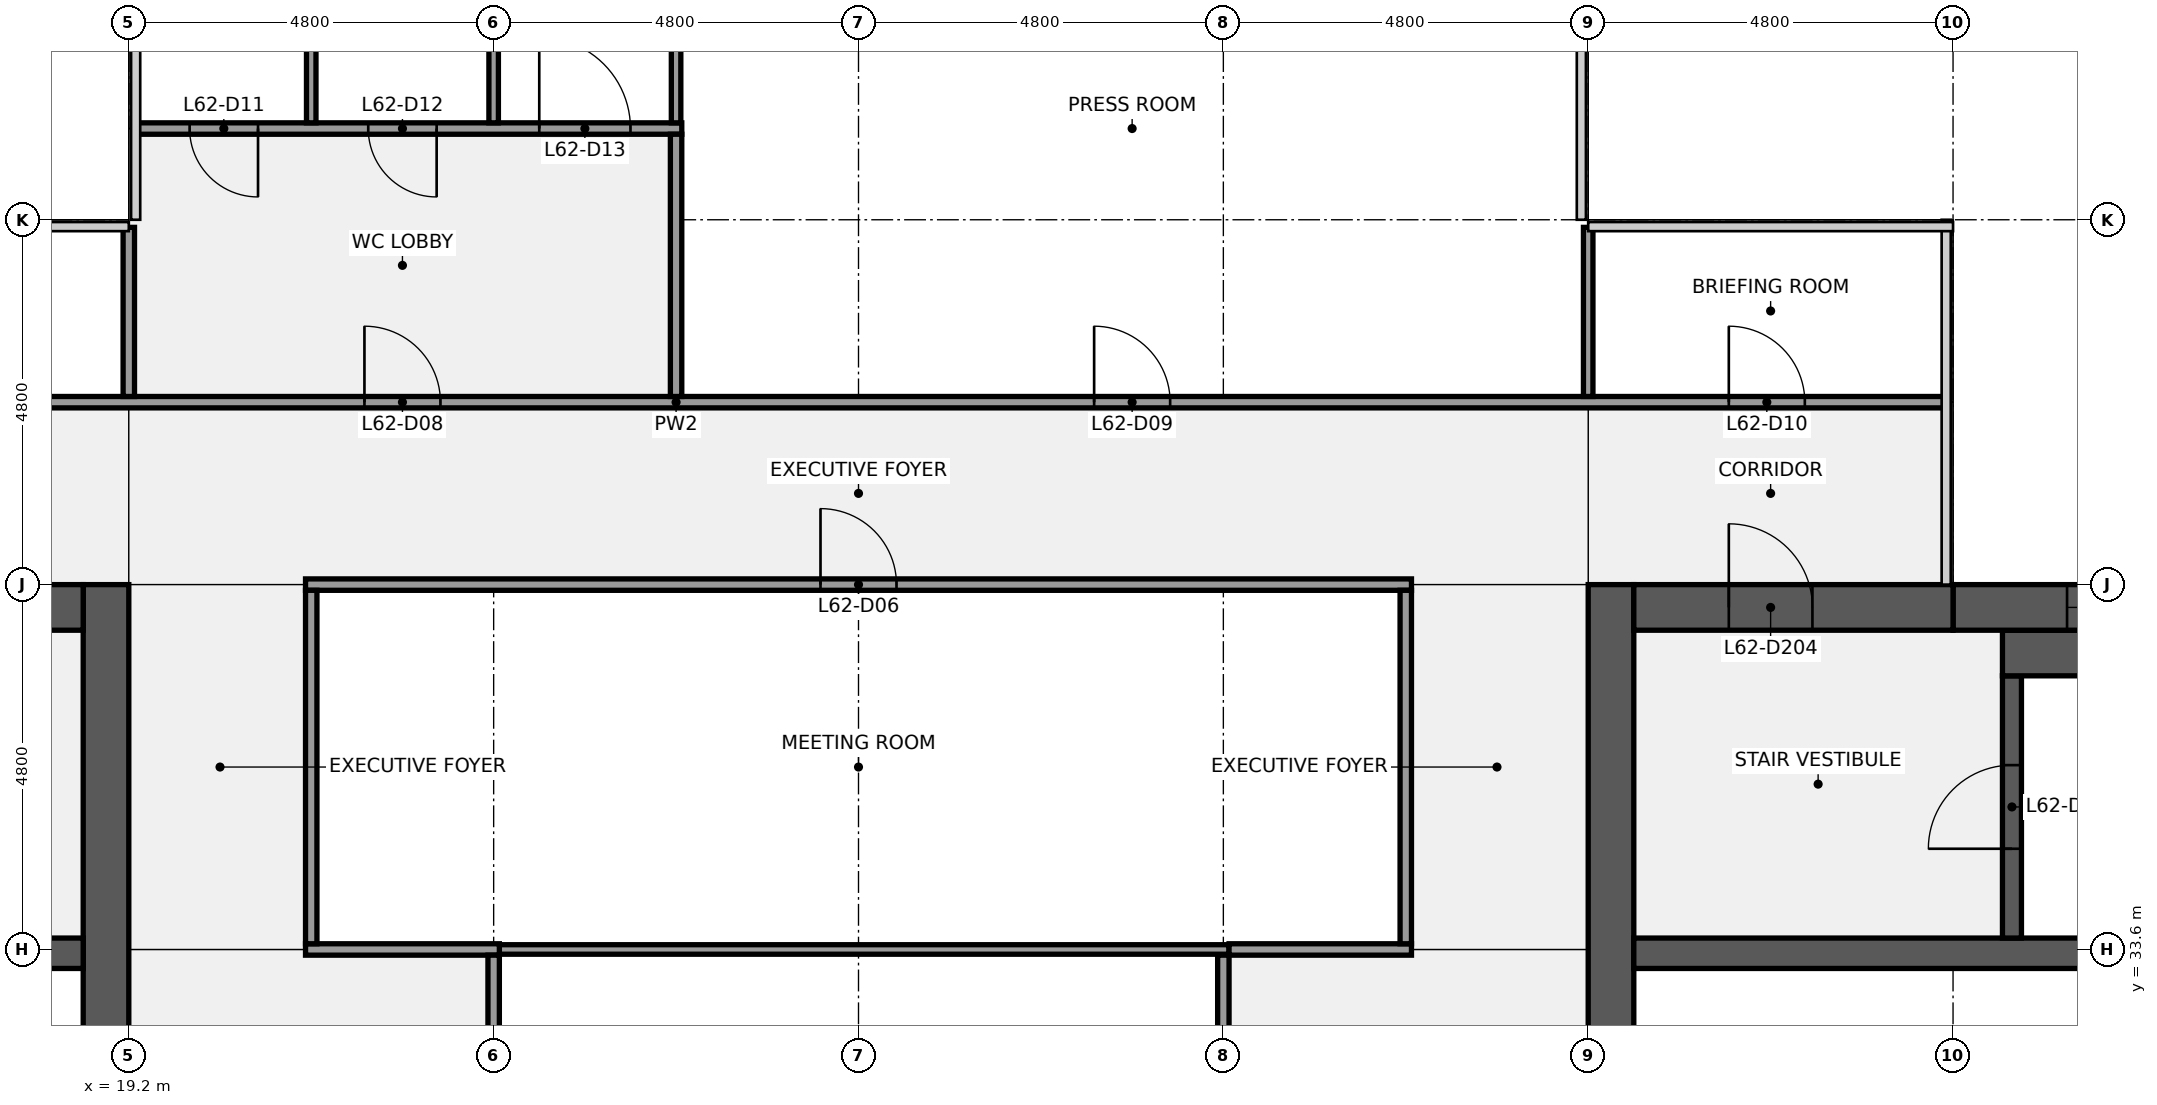
"""IFC4 building model, lengths in metres.
Left out: names, types, materials, properties, quantities, classifications, styles, units other than length and angle.
Written with IfcOpenShell. Run it as: python <this file> out.ifc"""

import sys

from ifc_helpers import new_model, si_unit, direction, frame, frame_2d, origin, place, context, subcontext, project, spatial, rectangle, extrude, element, fill, save


model = new_model("IFC4")
c1 = context("Model", 3, precision=1e-05, world=origin(), true_north=direction((0.0, 1.0)))
c2 = subcontext(c1, "Body", "Model", "MODEL_VIEW")
j1 = project(units=[si_unit("LENGTHUNIT", "METRE"), si_unit("PLANEANGLEUNIT", "RADIAN")], contexts=[c1])
p1 = place(None, origin())
s1 = spatial("IfcSite", under=j1, at=p1, CompositionType="ELEMENT")
p2 = place(p1, origin())
s2 = spatial("IfcBuilding", under=s1, at=p2, CompositionType="ELEMENT")
p3 = place(p2, frame((0.0, 0.0, 286.3)))
s3 = spatial("IfcBuildingStorey", under=s2, at=p3, CompositionType="ELEMENT", Elevation=286.3)
p4 = place(p3, frame((18.9, 38.4, 0.0), z_axis=(0.0, 0.0, 1.0), x_axis=(0.0, -1.0, 0.0)))
e1 = element("IfcWall", 1, at=p4, inside=s3, PredefinedType="SHEAR", context=c2, shape_type="SweptSolid", body=[
    extrude(rectangle(XDim=28.8, YDim=0.6, at=frame_2d((14.4, 0.0))), origin(), (0.0, 0.0, 1.0), 3.84),
])
p5 = place(p4, frame((18.3, 0.0, 0.0)))
e2 = element("IfcOpeningElement", 2, at=p5, cuts=e1, PredefinedType="OPENING", context=c2, shape_type="SweptSolid", body=[
    extrude(rectangle(XDim=1.8, YDim=2.1, at=frame_2d((0.9, 1.05))), frame((0.0, 0.31, 0.0), z_axis=(0.0, -1.0, 0.0), x_axis=(1.0, 0.0, 0.0)), (0.0, 0.0, 1.0), 0.62),
])
p6 = place(p4, frame((8.7, 0.0, 0.0)))
e3 = element("IfcOpeningElement", 3, at=p6, cuts=e1, PredefinedType="OPENING", context=c2, shape_type="SweptSolid", body=[
    extrude(rectangle(XDim=1.8, YDim=2.1, at=frame_2d((0.9, 1.05))), frame((0.0, 0.31, 0.0), z_axis=(0.0, -1.0, 0.0), x_axis=(1.0, 0.0, 0.0)), (0.0, 0.0, 1.0), 0.62),
])
p7 = place(p3, frame((0.6, 33.55, 0.0), z_axis=(0.0, 0.0, 1.0), x_axis=(1.0, 0.0, 0.0)))
e4 = element("IfcWall", 4, at=p7, inside=s3, PredefinedType="SHEAR", context=c2, shape_type="SweptSolid", body=[
    extrude(rectangle(XDim=18.0, YDim=0.4, at=frame_2d((9.0, 0.0))), origin(), (0.0, 0.0, 1.0), 3.84),
])
p8 = place(p3, frame((9.6, 38.1, 0.0), z_axis=(0.0, 0.0, 1.0), x_axis=(1.0, 0.0, 0.0)))
e5 = element("IfcWall", 5, at=p8, inside=s3, PredefinedType="SHEAR", context=c2, shape_type="SweptSolid", body=[
    extrude(rectangle(XDim=9.0, YDim=0.6, at=frame_2d((4.5, 0.0))), origin(), (0.0, 0.0, 1.0), 3.84),
])
p9 = place(p8, frame((6.65, 0.0, 0.0)))
e6 = element("IfcOpeningElement", 6, at=p9, cuts=e5, PredefinedType="OPENING", context=c2, shape_type="SweptSolid", body=[
    extrude(rectangle(XDim=1.1, YDim=2.1, at=frame_2d((0.55, 1.05))), frame((0.0, 0.31, 0.0), z_axis=(0.0, -1.0, 0.0), x_axis=(1.0, 0.0, 0.0)), (0.0, 0.0, 1.0), 0.62),
])
p10 = place(p3, frame((38.7, 9.6, 0.0), z_axis=(0.0, 0.0, 1.0), x_axis=(0.0, 1.0, 0.0)))
e7 = element("IfcWall", 7, at=p10, inside=s3, PredefinedType="SHEAR", context=c2, shape_type="SweptSolid", body=[
    extrude(rectangle(XDim=28.8, YDim=0.6, at=frame_2d((14.4, 0.0))), origin(), (0.0, 0.0, 1.0), 3.84),
])
p11 = place(p10, frame((8.7, 0.0, 0.0)))
e8 = element("IfcOpeningElement", 8, at=p11, cuts=e7, PredefinedType="OPENING", context=c2, shape_type="SweptSolid", body=[
    extrude(rectangle(XDim=1.8, YDim=2.1, at=frame_2d((0.9, 1.05))), frame((0.0, 0.31, 0.0), z_axis=(0.0, -1.0, 0.0), x_axis=(1.0, 0.0, 0.0)), (0.0, 0.0, 1.0), 0.62),
])
p12 = place(p10, frame((18.3, 0.0, 0.0)))
e9 = element("IfcOpeningElement", 9, at=p12, cuts=e7, PredefinedType="OPENING", context=c2, shape_type="SweptSolid", body=[
    extrude(rectangle(XDim=1.8, YDim=2.1, at=frame_2d((0.9, 1.05))), frame((0.0, 0.31, 0.0), z_axis=(0.0, -1.0, 0.0), x_axis=(1.0, 0.0, 0.0)), (0.0, 0.0, 1.0), 0.62),
])
p13 = place(p3, frame((39.0, 33.55, 0.0), z_axis=(0.0, 0.0, 1.0), x_axis=(1.0, 0.0, 0.0)))
e10 = element("IfcWall", 10, at=p13, inside=s3, PredefinedType="SHEAR", context=c2, shape_type="SweptSolid", body=[
    extrude(rectangle(XDim=18.0, YDim=0.4, at=frame_2d((9.0, 0.0))), origin(), (0.0, 0.0, 1.0), 3.84),
])
p14 = place(p3, frame((43.975, 33.75, 0.0), z_axis=(0.0, 0.0, 1.0), x_axis=(0.0, 1.0, 0.0)))
e11 = element("IfcWall", 11, at=p14, inside=s3, PredefinedType="SHEAR", context=c2, shape_type="SweptSolid", body=[
    extrude(rectangle(XDim=3.45, YDim=0.25, at=frame_2d((1.725, 0.0))), origin(), (0.0, 0.0, 1.0), 3.84),
])
p15 = place(p14, frame((1.175, 0.0, 0.0)))
e12 = element("IfcOpeningElement", 12, at=p15, cuts=e11, PredefinedType="OPENING", context=c2, shape_type="SweptSolid", body=[
    extrude(rectangle(XDim=1.1, YDim=2.1, at=frame_2d((0.55, 1.05))), frame((0.0, 0.135, 0.0), z_axis=(0.0, -1.0, 0.0), x_axis=(1.0, 0.0, 0.0)), (0.0, 0.0, 1.0), 0.27),
])
p16 = place(p3, frame((43.85, 37.5, 0.0), z_axis=(0.0, 0.0, 1.0), x_axis=(1.0, 0.0, 0.0)))
e13 = element("IfcWall", 13, at=p16, inside=s3, PredefinedType="SHEAR", context=c2, shape_type="SweptSolid", body=[
    extrude(rectangle(XDim=7.5, YDim=0.6, at=frame_2d((3.75, 0.0))), origin(), (0.0, 0.0, 1.0), 3.84),
])
p17 = place(p3, frame((43.2, 38.1, 0.0), z_axis=(0.0, 0.0, 1.0), x_axis=(1.0, 0.0, 0.0)))
e14 = element("IfcWall", 14, at=p17, inside=s3, PredefinedType="SHEAR", context=c2, shape_type="SweptSolid", body=[
    extrude(rectangle(XDim=13.8, YDim=0.6, at=frame_2d((6.9, 0.0))), origin(), (0.0, 0.0, 1.0), 3.84),
])
p18 = place(p17, frame((6.3, 0.0, 0.9)))
e15 = element("IfcOpeningElement", 15, at=p18, cuts=e14, PredefinedType="OPENING", context=c2, shape_type="SweptSolid", body=[
    extrude(rectangle(XDim=1.8, YDim=1.5, at=frame_2d((0.9, 0.75))), frame((0.0, 0.31, 0.0), z_axis=(0.0, -1.0, 0.0), x_axis=(1.0, 0.0, 0.0)), (0.0, 0.0, 1.0), 0.62),
])
p19 = place(p17, frame((1.5, 0.0, 0.9)))
e16 = element("IfcOpeningElement", 16, at=p19, cuts=e14, PredefinedType="OPENING", context=c2, shape_type="SweptSolid", body=[
    extrude(rectangle(XDim=1.8, YDim=1.5, at=frame_2d((0.9, 0.75))), frame((0.0, 0.31, 0.0), z_axis=(0.0, -1.0, 0.0), x_axis=(1.0, 0.0, 0.0)), (0.0, 0.0, 1.0), 0.62),
])
p20 = place(p3, frame((39.0, 38.1, 0.0), z_axis=(0.0, 0.0, 1.0), x_axis=(1.0, 0.0, 0.0)))
e17 = element("IfcWall", 17, at=p20, inside=s3, PredefinedType="SHEAR", context=c2, shape_type="SweptSolid", body=[
    extrude(rectangle(XDim=4.2, YDim=0.6, at=frame_2d((2.1, 0.0))), origin(), (0.0, 0.0, 1.0), 3.84),
])
p21 = place(p20, frame((1.25, 0.0, 0.0)))
e18 = element("IfcOpeningElement", 18, at=p21, cuts=e17, PredefinedType="OPENING", context=c2, shape_type="SweptSolid", body=[
    extrude(rectangle(XDim=1.1, YDim=2.1, at=frame_2d((0.55, 1.05))), frame((0.0, 0.31, 0.0), z_axis=(0.0, -1.0, 0.0), x_axis=(1.0, 0.0, 0.0)), (0.0, 0.0, 1.0), 0.62),
])
p22 = place(p3, frame((24.075, 33.6, 0.0), z_axis=(0.0, 0.0, 1.0), x_axis=(1.0, 0.0, 0.0)))
e19 = element("IfcWall", 19, at=p22, inside=s3, PredefinedType="PARTITIONING", context=c2, shape_type="SweptSolid", body=[
    extrude(rectangle(XDim=9.6, YDim=0.125, at=frame_2d((4.8, 0.0))), origin(), (0.0, 0.0, 1.0), 2.849),
])
p23 = place(p3, frame((21.525, 33.6, 0.0), z_axis=(0.0, 0.0, 1.0), x_axis=(1.0, 0.0, 0.0)))
e20 = element("IfcWall", 20, at=p23, inside=s3, PredefinedType="PARTITIONING", context=c2, shape_type="SweptSolid", body=[
    extrude(rectangle(XDim=2.55, YDim=0.15, at=frame_2d((1.275, 0.0))), origin(), (0.0, 0.0, 1.0), 2.849),
])
p24 = place(p3, frame((33.675, 33.6, 0.0), z_axis=(0.0, 0.0, 1.0), x_axis=(1.0, 0.0, 0.0)))
e21 = element("IfcWall", 21, at=p24, inside=s3, PredefinedType="PARTITIONING", context=c2, shape_type="SweptSolid", body=[
    extrude(rectangle(XDim=2.4, YDim=0.15, at=frame_2d((1.2, 0.0))), origin(), (0.0, 0.0, 1.0), 2.849),
])
p25 = place(p3, frame((21.525, 38.4, 0.0), z_axis=(0.0, 0.0, 1.0), x_axis=(1.0, 0.0, 0.0)))
e22 = element("IfcWall", 22, at=p25, inside=s3, PredefinedType="PARTITIONING", context=c2, shape_type="SweptSolid", body=[
    extrude(rectangle(XDim=14.55, YDim=0.15, at=frame_2d((7.275, 0.0))), origin(), (0.0, 0.0, 1.0), 2.849),
])
p26 = place(p25, frame((6.775, 0.0, 0.0)))
e23 = element("IfcOpeningElement", 23, at=p26, cuts=e22, PredefinedType="OPENING", context=c2, shape_type="SweptSolid", body=[
    extrude(rectangle(XDim=1.0, YDim=2.1, at=frame_2d((0.5, 1.05))), frame((0.0, 0.085, 0.0), z_axis=(0.0, -1.0, 0.0), x_axis=(1.0, 0.0, 0.0)), (0.0, 0.0, 1.0), 0.17),
])
p27 = place(p3, frame((9.7, 40.8, 0.0), z_axis=(0.0, 0.0, 1.0), x_axis=(1.0, 0.0, 0.0)))
e24 = element("IfcWall", 24, at=p27, inside=s3, PredefinedType="PARTITIONING", context=c2, shape_type="SweptSolid", body=[
    extrude(rectangle(XDim=33.4, YDim=0.15, at=frame_2d((16.7, 0.0))), origin(), (0.0, 0.0, 1.0), 2.849),
])
p28 = place(p27, frame((4.25, 0.0, 0.0)))
e25 = element("IfcOpeningElement", 25, at=p28, cuts=e24, PredefinedType="OPENING", context=c2, shape_type="SweptSolid", body=[
    extrude(rectangle(XDim=1.0, YDim=2.1, at=frame_2d((0.5, 1.05))), frame((0.0, 0.085, 0.0), z_axis=(0.0, -1.0, 0.0), x_axis=(1.0, 0.0, 0.0)), (0.0, 0.0, 1.0), 0.17),
])
p29 = place(p27, frame((12.6, 0.0, 0.0)))
e26 = element("IfcOpeningElement", 26, at=p29, cuts=e24, PredefinedType="OPENING", context=c2, shape_type="SweptSolid", body=[
    extrude(rectangle(XDim=1.0, YDim=2.1, at=frame_2d((0.5, 1.05))), frame((0.0, 0.085, 0.0), z_axis=(0.0, -1.0, 0.0), x_axis=(1.0, 0.0, 0.0)), (0.0, 0.0, 1.0), 0.17),
])
p30 = place(p27, frame((22.2, 0.0, 0.0)))
e27 = element("IfcOpeningElement", 27, at=p30, cuts=e24, PredefinedType="OPENING", context=c2, shape_type="SweptSolid", body=[
    extrude(rectangle(XDim=1.0, YDim=2.1, at=frame_2d((0.5, 1.05))), frame((0.0, 0.085, 0.0), z_axis=(0.0, -1.0, 0.0), x_axis=(1.0, 0.0, 0.0)), (0.0, 0.0, 1.0), 0.17),
])
p31 = place(p27, frame((30.55, 0.0, 0.0)))
e28 = element("IfcOpeningElement", 28, at=p31, cuts=e24, PredefinedType="OPENING", context=c2, shape_type="SweptSolid", body=[
    extrude(rectangle(XDim=1.0, YDim=2.1, at=frame_2d((0.5, 1.05))), frame((0.0, 0.085, 0.0), z_axis=(0.0, -1.0, 0.0), x_axis=(1.0, 0.0, 0.0)), (0.0, 0.0, 1.0), 0.17),
])
p32 = place(p3, frame((19.3, 44.4, 0.0), z_axis=(0.0, 0.0, 1.0), x_axis=(1.0, 0.0, 0.0)))
e29 = element("IfcWall", 29, at=p32, inside=s3, PredefinedType="PARTITIONING", context=c2, shape_type="SweptSolid", body=[
    extrude(rectangle(XDim=7.175, YDim=0.15, at=frame_2d((3.587, 0.0))), origin(), (0.0, 0.0, 1.0), 2.849),
])
p33 = place(p32, frame((0.7, 0.0, 0.0)))
e30 = element("IfcOpeningElement", 30, at=p33, cuts=e29, PredefinedType="OPENING", context=c2, shape_type="SweptSolid", body=[
    extrude(rectangle(XDim=0.9, YDim=2.1, at=frame_2d((0.45, 1.05))), frame((0.0, 0.085, 0.0), z_axis=(0.0, -1.0, 0.0), x_axis=(1.0, 0.0, 0.0)), (0.0, 0.0, 1.0), 0.17),
])
p34 = place(p32, frame((3.05, 0.0, 0.0)))
e31 = element("IfcOpeningElement", 31, at=p34, cuts=e29, PredefinedType="OPENING", context=c2, shape_type="SweptSolid", body=[
    extrude(rectangle(XDim=0.9, YDim=2.1, at=frame_2d((0.45, 1.05))), frame((0.0, 0.085, 0.0), z_axis=(0.0, -1.0, 0.0), x_axis=(1.0, 0.0, 0.0)), (0.0, 0.0, 1.0), 0.17),
])
p35 = place(p32, frame((5.3, 0.0, 0.0)))
e32 = element("IfcOpeningElement", 32, at=p35, cuts=e29, PredefinedType="OPENING", context=c2, shape_type="SweptSolid", body=[
    extrude(rectangle(XDim=1.2, YDim=2.1, at=frame_2d((0.6, 1.05))), frame((0.0, 0.085, 0.0), z_axis=(0.0, -1.0, 0.0), x_axis=(1.0, 0.0, 0.0)), (0.0, 0.0, 1.0), 0.17),
])
p36 = place(p3, frame((19.2, 40.875, 0.0), z_axis=(0.0, 0.0, 1.0), x_axis=(0.0, 1.0, 0.0)))
e33 = element("IfcWall", 33, at=p36, inside=s3, PredefinedType="PARTITIONING", context=c2, shape_type="SweptSolid", body=[
    extrude(rectangle(XDim=2.225, YDim=0.15, at=frame_2d((1.113, 0.0))), origin(), (0.0, 0.0, 1.0), 2.849),
])
p37 = place(p3, frame((21.6, 44.475, 0.0), z_axis=(0.0, 0.0, 1.0), x_axis=(0.0, 1.0, 0.0)))
e34 = element("IfcWall", 34, at=p37, inside=s3, PredefinedType="PARTITIONING", context=c2, shape_type="SweptSolid", body=[
    extrude(rectangle(XDim=3.425, YDim=0.125, at=frame_2d((1.712, 0.0))), origin(), (0.0, 0.0, 1.0), 2.849),
])
p38 = place(p3, frame((21.6, 33.675, 0.0), z_axis=(0.0, 0.0, 1.0), x_axis=(0.0, 1.0, 0.0)))
e35 = element("IfcWall", 35, at=p38, inside=s3, PredefinedType="PARTITIONING", context=c2, shape_type="SweptSolid", body=[
    extrude(rectangle(XDim=4.65, YDim=0.15, at=frame_2d((2.325, 0.0))), origin(), (0.0, 0.0, 1.0), 2.849),
])
p39 = place(p3, frame((24.0, 44.475, 0.0), z_axis=(0.0, 0.0, 1.0), x_axis=(0.0, 1.0, 0.0)))
e36 = element("IfcWall", 36, at=p39, inside=s3, PredefinedType="PARTITIONING", context=c2, shape_type="SweptSolid", body=[
    extrude(rectangle(XDim=3.425, YDim=0.125, at=frame_2d((1.712, 0.0))), origin(), (0.0, 0.0, 1.0), 2.849),
])
p40 = place(p3, frame((24.0, 28.875, 0.0), z_axis=(0.0, 0.0, 1.0), x_axis=(0.0, 1.0, 0.0)))
e37 = element("IfcWall", 37, at=p40, inside=s3, PredefinedType="PARTITIONING", context=c2, shape_type="SweptSolid", body=[
    extrude(rectangle(XDim=4.65, YDim=0.15, at=frame_2d((2.325, 0.0))), origin(), (0.0, 0.0, 1.0), 2.849),
])
p41 = place(p3, frame((26.4, 44.475, 0.0), z_axis=(0.0, 0.0, 1.0), x_axis=(0.0, 1.0, 0.0)))
e38 = element("IfcWall", 38, at=p41, inside=s3, PredefinedType="PARTITIONING", context=c2, shape_type="SweptSolid", body=[
    extrude(rectangle(XDim=3.425, YDim=0.125, at=frame_2d((1.712, 0.0))), origin(), (0.0, 0.0, 1.0), 2.849),
])
p42 = place(p3, frame((26.4, 40.875, 0.0), z_axis=(0.0, 0.0, 1.0), x_axis=(0.0, 1.0, 0.0)))
e39 = element("IfcWall", 39, at=p42, inside=s3, PredefinedType="PARTITIONING", context=c2, shape_type="SweptSolid", body=[
    extrude(rectangle(XDim=3.45, YDim=0.15, at=frame_2d((1.725, 0.0))), origin(), (0.0, 0.0, 1.0), 2.849),
])
for number, where, z_axis, x_axis in (
    (40, (33.6, 28.875, 0.0), (0.0, 0.0, 1.0), (0.0, 1.0, 0.0)),
    (41, (36.0, 33.675, 0.0), (0.0, 0.0, 1.0), (0.0, 1.0, 0.0)),
):
    element("IfcWall", number, at=place(p3, frame(where, z_axis=z_axis, x_axis=x_axis)), inside=s3, PredefinedType="PARTITIONING", context=c2, shape_type="SweptSolid", body=[
        extrude(rectangle(XDim=4.65, YDim=0.15, at=frame_2d((2.325, 0.0))), origin(), (0.0, 0.0, 1.0), 2.849),
    ])
p43 = place(p3, frame((38.4, 40.875, 0.0), z_axis=(0.0, 0.0, 1.0), x_axis=(0.0, 1.0, 0.0)))
e42 = element("IfcWall", 42, at=p43, inside=s3, PredefinedType="PARTITIONING", context=c2, shape_type="SweptSolid", body=[
    extrude(rectangle(XDim=2.225, YDim=0.125, at=frame_2d((1.113, 0.0))), origin(), (0.0, 0.0, 1.0), 2.849),
])
p44 = place(p15, origin())
e43 = element("IfcDoor", 43, at=p44, inside=s3, OperationType="SINGLE_SWING_LEFT", PredefinedType="DOOR", context=c2, shape_type="SweptSolid", body=[
    extrude(rectangle(XDim=1.1, YDim=2.1, at=frame_2d((0.55, 1.05))), frame((0.0, 0.025, 0.0), z_axis=(0.0, -1.0, 0.0), x_axis=(1.0, 0.0, 0.0)), (0.0, 0.0, 1.0), 0.05),
])
fill(e12, e43)
p45 = place(p21, origin())
e44 = element("IfcDoor", 44, at=p45, inside=s3, OperationType="SINGLE_SWING_LEFT", PredefinedType="DOOR", context=c2, shape_type="SweptSolid", body=[
    extrude(rectangle(XDim=1.1, YDim=2.1, at=frame_2d((0.55, 1.05))), frame((0.0, 0.025, 0.0), z_axis=(0.0, -1.0, 0.0), x_axis=(1.0, 0.0, 0.0)), (0.0, 0.0, 1.0), 0.05),
])
fill(e18, e44)
p46 = place(p19, origin())
e45 = element("IfcWindow", 45, at=p46, inside=s3, PartitioningType="SINGLE_PANEL", PredefinedType="WINDOW", context=c2, shape_type="SweptSolid", body=[
    extrude(rectangle(XDim=1.8, YDim=1.5, at=frame_2d((0.9, 0.75))), frame((0.0, 0.03, 0.0), z_axis=(0.0, -1.0, 0.0), x_axis=(1.0, 0.0, 0.0)), (0.0, 0.0, 1.0), 0.06),
])
fill(e16, e45)
p47 = place(p26, origin())
e46 = element("IfcDoor", 46, at=p47, inside=s3, OperationType="SINGLE_SWING_LEFT", PredefinedType="DOOR", context=c2, shape_type="SweptSolid", body=[
    extrude(rectangle(XDim=1.0, YDim=2.1, at=frame_2d((0.5, 1.05))), frame((0.0, 0.025, 0.0), z_axis=(0.0, -1.0, 0.0), x_axis=(1.0, 0.0, 0.0)), (0.0, 0.0, 1.0), 0.05),
])
fill(e23, e46)
p48 = place(p29, origin())
e47 = element("IfcDoor", 47, at=p48, inside=s3, OperationType="SINGLE_SWING_LEFT", PredefinedType="DOOR", context=c2, shape_type="SweptSolid", body=[
    extrude(rectangle(XDim=1.0, YDim=2.1, at=frame_2d((0.5, 1.05))), frame((0.0, 0.025, 0.0), z_axis=(0.0, -1.0, 0.0), x_axis=(1.0, 0.0, 0.0)), (0.0, 0.0, 1.0), 0.05),
])
fill(e26, e47)
p49 = place(p30, origin())
e48 = element("IfcDoor", 48, at=p49, inside=s3, OperationType="SINGLE_SWING_LEFT", PredefinedType="DOOR", context=c2, shape_type="SweptSolid", body=[
    extrude(rectangle(XDim=1.0, YDim=2.1, at=frame_2d((0.5, 1.05))), frame((0.0, 0.025, 0.0), z_axis=(0.0, -1.0, 0.0), x_axis=(1.0, 0.0, 0.0)), (0.0, 0.0, 1.0), 0.05),
])
fill(e27, e48)
p50 = place(p31, origin())
e49 = element("IfcDoor", 49, at=p50, inside=s3, OperationType="SINGLE_SWING_LEFT", PredefinedType="DOOR", context=c2, shape_type="SweptSolid", body=[
    extrude(rectangle(XDim=1.0, YDim=2.1, at=frame_2d((0.5, 1.05))), frame((0.0, 0.025, 0.0), z_axis=(0.0, -1.0, 0.0), x_axis=(1.0, 0.0, 0.0)), (0.0, 0.0, 1.0), 0.05),
])
fill(e28, e49)
p51 = place(p33, origin())
e50 = element("IfcDoor", 50, at=p51, inside=s3, OperationType="SINGLE_SWING_RIGHT", PredefinedType="DOOR", context=c2, shape_type="SweptSolid", body=[
    extrude(rectangle(XDim=0.9, YDim=2.1, at=frame_2d((0.45, 1.05))), frame((0.0, 0.025, 0.0), z_axis=(0.0, -1.0, 0.0), x_axis=(1.0, 0.0, 0.0)), (0.0, 0.0, 1.0), 0.05),
])
fill(e30, e50)
p52 = place(p34, origin())
e51 = element("IfcDoor", 51, at=p52, inside=s3, OperationType="SINGLE_SWING_RIGHT", PredefinedType="DOOR", context=c2, shape_type="SweptSolid", body=[
    extrude(rectangle(XDim=0.9, YDim=2.1, at=frame_2d((0.45, 1.05))), frame((0.0, 0.025, 0.0), z_axis=(0.0, -1.0, 0.0), x_axis=(1.0, 0.0, 0.0)), (0.0, 0.0, 1.0), 0.05),
])
fill(e31, e51)
p53 = place(p35, origin())
e52 = element("IfcDoor", 52, at=p53, inside=s3, OperationType="SINGLE_SWING_LEFT", PredefinedType="DOOR", context=c2, shape_type="SweptSolid", body=[
    extrude(rectangle(XDim=1.2, YDim=2.1, at=frame_2d((0.6, 1.05))), frame((0.0, 0.025, 0.0), z_axis=(0.0, -1.0, 0.0), x_axis=(1.0, 0.0, 0.0)), (0.0, 0.0, 1.0), 0.05),
])
fill(e32, e52)
save(model, sys.argv[1])
